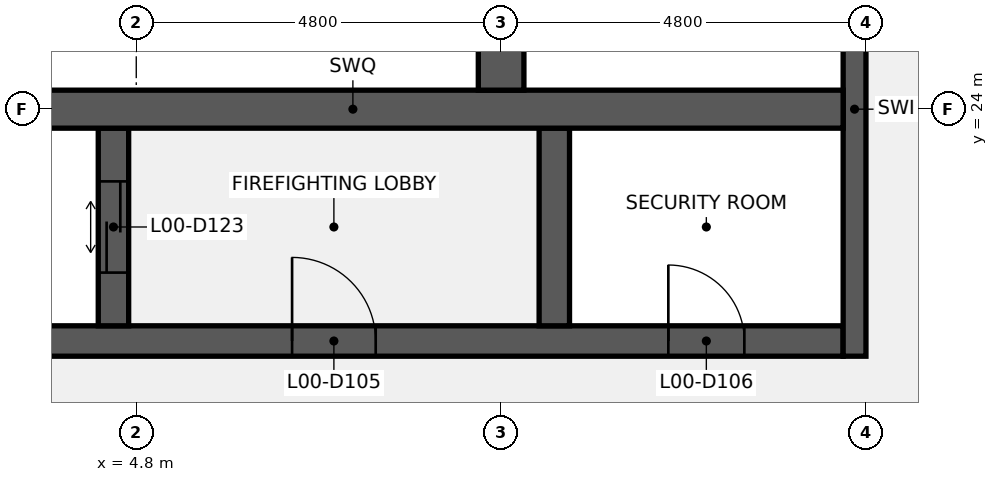
"""IFC4 building model, lengths in metres.
Left out: names, types, materials, properties, quantities, classifications, styles, units other than length and angle.
Written with IfcOpenShell. Run it as: python <this file> out.ifc"""

import sys

from ifc_helpers import new_model, si_unit, direction, frame, frame_2d, origin, place, context, subcontext, project, spatial, rectangle, extrude, element, fill, save


model = new_model("IFC4")
c1 = context("Model", 3, precision=1e-05, world=origin(), true_north=direction((0.0, 1.0)))
c2 = subcontext(c1, "Body", "Model", "MODEL_VIEW")
j1 = project(units=[si_unit("LENGTHUNIT", "METRE"), si_unit("PLANEANGLEUNIT", "RADIAN")], contexts=[c1])
p1 = place(None, origin())
s1 = spatial("IfcSite", under=j1, at=p1, CompositionType="ELEMENT")
p2 = place(p1, origin())
s2 = spatial("IfcBuilding", under=s1, at=p2, CompositionType="ELEMENT")
p3 = place(p2, origin())
s3 = spatial("IfcBuildingStorey", under=s2, at=p3, CompositionType="ELEMENT", Elevation=0.0)
p4 = place(p3, frame((1.2, 20.95, -2.0), z_axis=(0.0, 0.0, 1.0), x_axis=(1.0, 0.0, 0.0)))
e1 = element("IfcWall", 1, at=p4, inside=s3, PredefinedType="SHEAR", context=c2, shape_type="SweptSolid", body=[
    extrude(rectangle(XDim=12.9, YDim=0.4, at=frame_2d((6.45, 0.0))), origin(), (0.0, 0.0, 1.0), 14.3),
])
p5 = place(p4, frame((5.65, 0.0, 2.0)))
e2 = element("IfcOpeningElement", 2, at=p5, cuts=e1, PredefinedType="OPENING", context=c2, shape_type="SweptSolid", body=[
    extrude(rectangle(XDim=1.1, YDim=2.1, at=frame_2d((0.55, 1.05))), frame((0.0, 0.21, 0.0), z_axis=(0.0, -1.0, 0.0), x_axis=(1.0, 0.0, 0.0)), (0.0, 0.0, 1.0), 0.42),
])
p6 = place(p4, frame((10.6, 0.0, 2.0)))
e3 = element("IfcOpeningElement", 3, at=p6, cuts=e1, PredefinedType="OPENING", context=c2, shape_type="SweptSolid", body=[
    extrude(rectangle(XDim=1.0, YDim=2.1, at=frame_2d((0.5, 1.05))), frame((0.0, 0.21, 0.0), z_axis=(0.0, -1.0, 0.0), x_axis=(1.0, 0.0, 0.0)), (0.0, 0.0, 1.0), 0.42),
])
p7 = place(p3, frame((14.25, 20.75, -2.0), z_axis=(0.0, 0.0, 1.0), x_axis=(0.0, 1.0, 0.0)))
e4 = element("IfcWall", 4, at=p7, inside=s3, PredefinedType="SHEAR", context=c2, shape_type="SweptSolid", body=[
    extrude(rectangle(XDim=6.5, YDim=0.3, at=frame_2d((3.25, 0.0))), origin(), (0.0, 0.0, 1.0), 14.3),
])
p8 = place(p3, frame((4.5, 21.15, -2.0), z_axis=(0.0, 0.0, 1.0), x_axis=(0.0, 1.0, 0.0)))
e5 = element("IfcWall", 5, at=p8, inside=s3, PredefinedType="SHEAR", context=c2, shape_type="SweptSolid", body=[
    extrude(rectangle(XDim=2.6, YDim=0.4, at=frame_2d((1.3, 0.0))), origin(), (0.0, 0.0, 1.0), 14.3),
])
p9 = place(p8, frame((0.7, 0.0, 2.0)))
e6 = element("IfcOpeningElement", 6, at=p9, cuts=e5, PredefinedType="OPENING", context=c2, shape_type="SweptSolid", body=[
    extrude(rectangle(XDim=1.2, YDim=2.1, at=frame_2d((0.6, 1.05))), frame((0.0, 0.21, 0.0), z_axis=(0.0, -1.0, 0.0), x_axis=(1.0, 0.0, 0.0)), (0.0, 0.0, 1.0), 0.42),
])
p10 = place(p3, frame((10.3, 21.15, -2.0), z_axis=(0.0, 0.0, 1.0), x_axis=(0.0, 1.0, 0.0)))
e7 = element("IfcWall", 7, at=p10, inside=s3, PredefinedType="SHEAR", context=c2, shape_type="SweptSolid", body=[
    extrude(rectangle(XDim=2.6, YDim=0.4, at=frame_2d((1.3, 0.0))), origin(), (0.0, 0.0, 1.0), 14.3),
])
p11 = place(p3, frame((1.2, 24.0, -2.0), z_axis=(0.0, 0.0, 1.0), x_axis=(1.0, 0.0, 0.0)))
e8 = element("IfcWall", 8, at=p11, inside=s3, PredefinedType="SHEAR", context=c2, shape_type="SweptSolid", body=[
    extrude(rectangle(XDim=12.9, YDim=0.5, at=frame_2d((6.45, 0.0))), origin(), (0.0, 0.0, 1.0), 14.3),
])
p12 = place(p3, frame((9.6, 24.25, -2.0), z_axis=(0.0, 0.0, 1.0), x_axis=(0.0, 1.0, 0.0)))
e9 = element("IfcWall", 9, at=p12, inside=s3, PredefinedType="SHEAR", context=c2, shape_type="SweptSolid", body=[
    extrude(rectangle(XDim=2.6, YDim=0.6, at=frame_2d((1.3, 0.0))), origin(), (0.0, 0.0, 1.0), 14.3),
])
p13 = place(p5, origin())
e10 = element("IfcDoor", 10, at=p13, inside=s3, OperationType="SINGLE_SWING_LEFT", PredefinedType="DOOR", context=c2, shape_type="SweptSolid", body=[
    extrude(rectangle(XDim=1.1, YDim=2.1, at=frame_2d((0.55, 1.05))), frame((0.0, 0.025, 0.0), z_axis=(0.0, -1.0, 0.0), x_axis=(1.0, 0.0, 0.0)), (0.0, 0.0, 1.0), 0.05),
])
fill(e2, e10)
p14 = place(p6, origin())
e11 = element("IfcDoor", 11, at=p14, inside=s3, OperationType="SINGLE_SWING_LEFT", PredefinedType="DOOR", context=c2, shape_type="SweptSolid", body=[
    extrude(rectangle(XDim=1.0, YDim=2.1, at=frame_2d((0.5, 1.05))), frame((0.0, 0.025, 0.0), z_axis=(0.0, -1.0, 0.0), x_axis=(1.0, 0.0, 0.0)), (0.0, 0.0, 1.0), 0.05),
])
fill(e3, e11)
p15 = place(p9, origin())
e12 = element("IfcDoor", 12, at=p15, inside=s3, OperationType="DOUBLE_DOOR_SLIDING", PredefinedType="DOOR", context=c2, shape_type="SweptSolid", body=[
    extrude(rectangle(XDim=1.2, YDim=2.1, at=frame_2d((0.6, 1.05))), frame((0.0, 0.025, 0.0), z_axis=(0.0, -1.0, 0.0), x_axis=(1.0, 0.0, 0.0)), (0.0, 0.0, 1.0), 0.05),
])
fill(e6, e12)
save(model, sys.argv[1])
